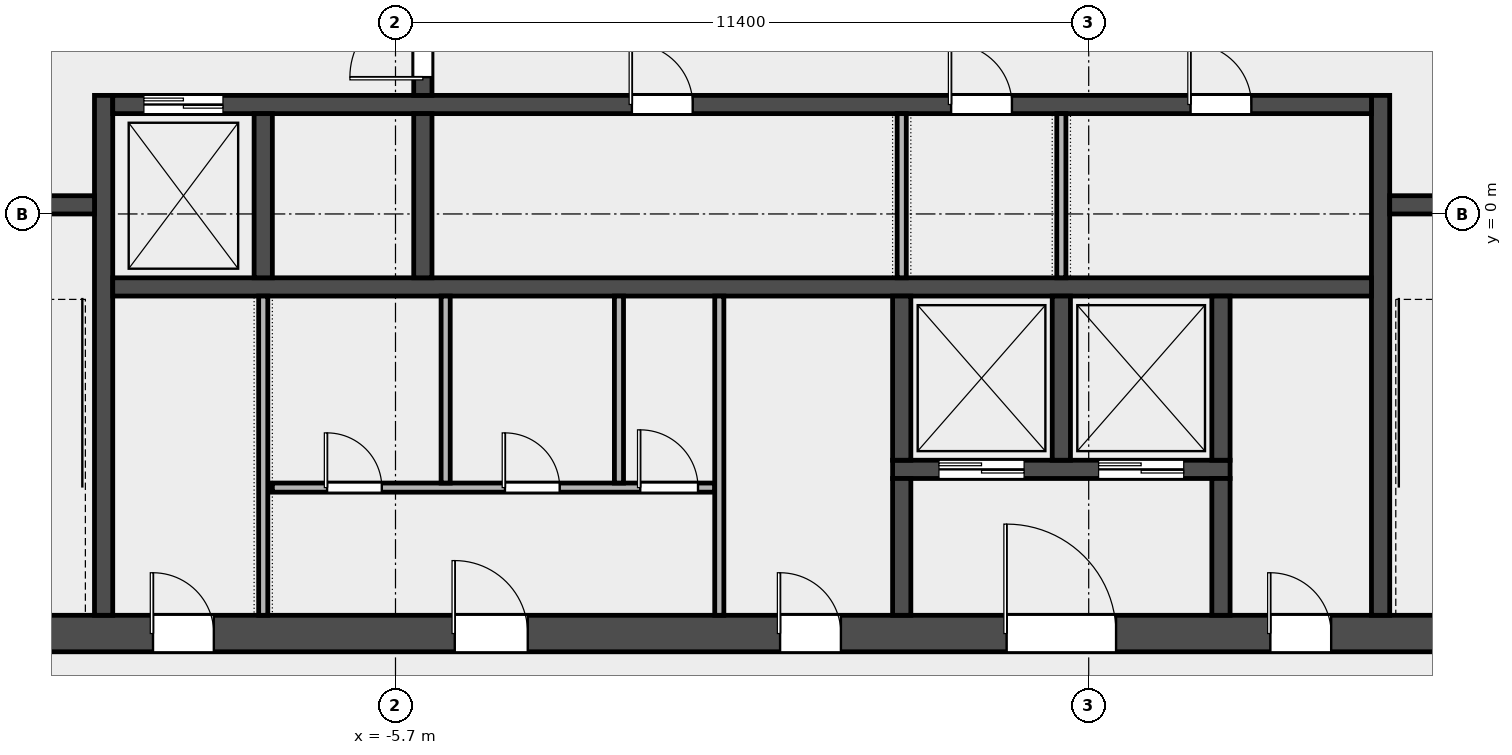
"""IFC4 building model, lengths in metres.
Left out: names, types, materials, properties, quantities, classifications, styles, units other than length and angle.
Written with IfcOpenShell. Run it as: python <this file> out.ifc"""

import sys

from ifc_helpers import new_model, si_unit, direction, frame, frame_2d, origin, place, context, subcontext, project, spatial, rectangle, extrude, element, fill, save


model = new_model("IFC4")
c1 = context("Model", 3, precision=1e-05, world=origin(), true_north=direction((0.0, 1.0)))
c2 = subcontext(c1, "Body", "Model", "MODEL_VIEW")
j1 = project(units=[si_unit("LENGTHUNIT", "METRE"), si_unit("PLANEANGLEUNIT", "RADIAN")], contexts=[c1])
p1 = place(None, origin())
s1 = spatial("IfcSite", under=j1, at=p1, CompositionType="ELEMENT")
p2 = place(p1, origin())
s2 = spatial("IfcBuilding", under=s1, at=p2, CompositionType="ELEMENT")
p3 = place(p2, frame((0.0, 0.0, 299.4)))
s3 = spatial("IfcBuildingStorey", under=s2, at=p3, CompositionType="ELEMENT", Elevation=299.4)
p4 = place(p3, frame((-14.4, -6.9, 0.0), z_axis=(0.0, 0.0, 1.0), x_axis=(1.0, 0.0, 0.0)))
e1 = element("IfcWall", 1, at=p4, inside=s3, PredefinedType="SHEAR", context=c2, shape_type="SweptSolid", body=[
    extrude(rectangle(XDim=28.8, YDim=0.6, at=frame_2d((14.4, 0.0))), origin(), (0.0, 0.0, 1.0), 3.7),
])
p5 = place(p4, frame((4.712, 0.0, 0.0)))
e2 = element("IfcOpeningElement", 2, at=p5, cuts=e1, PredefinedType="OPENING", context=c2, shape_type="SweptSolid", body=[
    extrude(rectangle(XDim=1.0, YDim=2.1, at=frame_2d((0.5, 1.05))), frame((0.0, 0.312, 0.0), z_axis=(0.0, -1.0, 0.0), x_axis=(1.0, 0.0, 0.0)), (0.0, 0.0, 1.0), 0.624),
])
p6 = place(p4, frame((9.675, 0.0, 0.0)))
e3 = element("IfcOpeningElement", 3, at=p6, cuts=e1, PredefinedType="OPENING", context=c2, shape_type="SweptSolid", body=[
    extrude(rectangle(XDim=1.2, YDim=2.1, at=frame_2d((0.6, 1.05))), frame((0.0, 0.312, 0.0), z_axis=(0.0, -1.0, 0.0), x_axis=(1.0, 0.0, 0.0)), (0.0, 0.0, 1.0), 0.624),
])
p7 = place(p4, frame((15.025, 0.0, 0.0)))
e4 = element("IfcOpeningElement", 4, at=p7, cuts=e1, PredefinedType="OPENING", context=c2, shape_type="SweptSolid", body=[
    extrude(rectangle(XDim=1.0, YDim=2.1, at=frame_2d((0.5, 1.05))), frame((0.0, 0.312, 0.0), z_axis=(0.0, -1.0, 0.0), x_axis=(1.0, 0.0, 0.0)), (0.0, 0.0, 1.0), 0.624),
])
p8 = place(p4, frame((18.75, 0.0, 0.0)))
e5 = element("IfcOpeningElement", 5, at=p8, cuts=e1, PredefinedType="OPENING", context=c2, shape_type="SweptSolid", body=[
    extrude(rectangle(XDim=1.8, YDim=2.1, at=frame_2d((0.9, 1.05))), frame((0.0, 0.312, 0.0), z_axis=(0.0, -1.0, 0.0), x_axis=(1.0, 0.0, 0.0)), (0.0, 0.0, 1.0), 0.624),
])
p9 = place(p4, frame((23.087, 0.0, 0.0)))
e6 = element("IfcOpeningElement", 6, at=p9, cuts=e1, PredefinedType="OPENING", context=c2, shape_type="SweptSolid", body=[
    extrude(rectangle(XDim=1.0, YDim=2.1, at=frame_2d((0.5, 1.05))), frame((0.0, 0.312, 0.0), z_axis=(0.0, -1.0, 0.0), x_axis=(1.0, 0.0, 0.0)), (0.0, 0.0, 1.0), 0.624),
])
for number, where, z_axis, x_axis in (
    (7, (-10.5, -6.6, 0.0), (0.0, 0.0, 1.0), (0.0, 1.0, 0.0)),
    (8, (10.5, -6.6, 0.0), (0.0, 0.0, 1.0), (0.0, 1.0, 0.0)),
):
    element("IfcWall", number, at=place(p3, frame(where, z_axis=z_axis, x_axis=x_axis)), inside=s3, PredefinedType="SHEAR", context=c2, shape_type="SweptSolid", body=[
        extrude(rectangle(XDim=8.55, YDim=0.3, at=frame_2d((4.275, 0.0))), origin(), (0.0, 0.0, 1.0), 3.7),
    ])
p10 = place(p3, frame((-13.8, 0.15, 0.0), z_axis=(0.0, 0.0, 1.0), x_axis=(1.0, 0.0, 0.0)))
e9 = element("IfcWall", 9, at=p10, inside=s3, PredefinedType="SOLIDWALL", context=c2, shape_type="SweptSolid", body=[
    extrude(rectangle(XDim=3.15, YDim=0.3, at=frame_2d((1.575, 0.0))), origin(), (0.0, 0.0, 1.0), 3.7),
])
p11 = place(p10, frame((0.975, 0.0, 0.0)))
e10 = element("IfcOpeningElement", 10, at=p11, cuts=e9, PredefinedType="OPENING", context=c2, shape_type="SweptSolid", body=[
    extrude(rectangle(XDim=1.1, YDim=2.1, at=frame_2d((0.55, 1.05))), frame((0.0, 0.162, 0.0), z_axis=(0.0, -1.0, 0.0), x_axis=(1.0, 0.0, 0.0)), (0.0, 0.0, 1.0), 0.324),
])
p12 = place(p3, frame((10.65, 0.15, 0.0), z_axis=(0.0, 0.0, 1.0), x_axis=(1.0, 0.0, 0.0)))
e11 = element("IfcWall", 11, at=p12, inside=s3, PredefinedType="SOLIDWALL", context=c2, shape_type="SweptSolid", body=[
    extrude(rectangle(XDim=3.15, YDim=0.3, at=frame_2d((1.575, 0.0))), origin(), (0.0, 0.0, 1.0), 3.7),
])
p13 = place(p12, frame((1.025, 0.0, 0.0)))
e12 = element("IfcOpeningElement", 12, at=p13, cuts=e11, PredefinedType="OPENING", context=c2, shape_type="SweptSolid", body=[
    extrude(rectangle(XDim=1.1, YDim=2.1, at=frame_2d((0.55, 1.05))), frame((0.0, 0.162, 0.0), z_axis=(0.0, -1.0, 0.0), x_axis=(1.0, 0.0, 0.0)), (0.0, 0.0, 1.0), 0.324),
])
p14 = place(p3, frame((-10.35, -1.2, 0.0), z_axis=(0.0, 0.0, 1.0), x_axis=(1.0, 0.0, 0.0)))
e13 = element("IfcWall", 13, at=p14, inside=s3, PredefinedType="SOLIDWALL", context=c2, shape_type="SweptSolid", body=[
    extrude(rectangle(XDim=20.7, YDim=0.3, at=frame_2d((10.35, 0.0))), origin(), (0.0, 0.0, 1.0), 3.7),
])
p15 = place(p3, frame((-10.35, 1.8, 0.0), z_axis=(0.0, 0.0, 1.0), x_axis=(1.0, 0.0, 0.0)))
e14 = element("IfcWall", 14, at=p15, inside=s3, PredefinedType="SOLIDWALL", context=c2, shape_type="SweptSolid", body=[
    extrude(rectangle(XDim=20.7, YDim=0.3, at=frame_2d((10.35, 0.0))), origin(), (0.0, 0.0, 1.0), 3.7),
])
p16 = place(p15, frame((0.512, 0.0, 0.0)))
e15 = element("IfcOpeningElement", 15, at=p16, cuts=e14, PredefinedType="OPENING", context=c2, shape_type="SweptSolid", body=[
    extrude(rectangle(XDim=1.3, YDim=2.1, at=frame_2d((0.65, 1.05))), frame((0.0, 0.162, 0.0), z_axis=(0.0, -1.0, 0.0), x_axis=(1.0, 0.0, 0.0)), (0.0, 0.0, 1.0), 0.324),
])
p17 = place(p15, frame((8.538, 0.0, 0.0)))
e16 = element("IfcOpeningElement", 16, at=p17, cuts=e14, PredefinedType="OPENING", context=c2, shape_type="SweptSolid", body=[
    extrude(rectangle(XDim=1.0, YDim=2.1, at=frame_2d((0.5, 1.05))), frame((0.0, 0.162, 0.0), z_axis=(0.0, -1.0, 0.0), x_axis=(1.0, 0.0, 0.0)), (0.0, 0.0, 1.0), 0.324),
])
p18 = place(p15, frame((13.788, 0.0, 0.0)))
e17 = element("IfcOpeningElement", 17, at=p18, cuts=e14, PredefinedType="OPENING", context=c2, shape_type="SweptSolid", body=[
    extrude(rectangle(XDim=1.0, YDim=2.1, at=frame_2d((0.5, 1.05))), frame((0.0, 0.162, 0.0), z_axis=(0.0, -1.0, 0.0), x_axis=(1.0, 0.0, 0.0)), (0.0, 0.0, 1.0), 0.324),
])
p19 = place(p15, frame((17.725, 0.0, 0.0)))
e18 = element("IfcOpeningElement", 18, at=p19, cuts=e14, PredefinedType="OPENING", context=c2, shape_type="SweptSolid", body=[
    extrude(rectangle(XDim=1.0, YDim=2.1, at=frame_2d((0.5, 1.05))), frame((0.0, 0.162, 0.0), z_axis=(0.0, -1.0, 0.0), x_axis=(1.0, 0.0, 0.0)), (0.0, 0.0, 1.0), 0.324),
])
for number, where, z_axis, x_axis in (
    (19, (-7.875, -1.05, 0.0), (0.0, 0.0, 1.0), (0.0, 1.0, 0.0)),
    (20, (-5.25, -1.05, 0.0), (0.0, 0.0, 1.0), (0.0, 1.0, 0.0)),
):
    element("IfcWall", number, at=place(p3, frame(where, z_axis=z_axis, x_axis=x_axis)), inside=s3, PredefinedType="SOLIDWALL", context=c2, shape_type="SweptSolid", body=[
        extrude(rectangle(XDim=2.7, YDim=0.3, at=frame_2d((1.35, 0.0))), origin(), (0.0, 0.0, 1.0), 3.7),
    ])
p20 = place(p3, frame((-5.25, 1.95, 0.0), z_axis=(0.0, 0.0, 1.0), x_axis=(0.0, 1.0, 0.0)))
e21 = element("IfcWall", 21, at=p20, inside=s3, PredefinedType="SOLIDWALL", context=c2, shape_type="SweptSolid", body=[
    extrude(rectangle(XDim=3.3, YDim=0.3, at=frame_2d((1.65, 0.0))), origin(), (0.0, 0.0, 1.0), 3.7),
])
p21 = place(p20, frame((0.3, 0.0, 0.0)))
e22 = element("IfcOpeningElement", 22, at=p21, cuts=e21, PredefinedType="OPENING", context=c2, shape_type="SweptSolid", body=[
    extrude(rectangle(XDim=1.2, YDim=2.1, at=frame_2d((0.6, 1.05))), frame((0.0, 0.162, 0.0), z_axis=(0.0, -1.0, 0.0), x_axis=(1.0, 0.0, 0.0)), (0.0, 0.0, 1.0), 0.324),
])
p22 = place(p20, frame((1.8, 0.0, 0.0)))
e23 = element("IfcOpeningElement", 23, at=p22, cuts=e21, PredefinedType="OPENING", context=c2, shape_type="SweptSolid", body=[
    extrude(rectangle(XDim=1.2, YDim=2.1, at=frame_2d((0.6, 1.05))), frame((0.0, 0.162, 0.0), z_axis=(0.0, -1.0, 0.0), x_axis=(1.0, 0.0, 0.0)), (0.0, 0.0, 1.0), 0.324),
])
p23 = place(p3, frame((2.475, -4.2, 0.0), z_axis=(0.0, 0.0, 1.0), x_axis=(1.0, 0.0, 0.0)))
e24 = element("IfcWall", 24, at=p23, inside=s3, PredefinedType="SOLIDWALL", context=c2, shape_type="SweptSolid", body=[
    extrude(rectangle(XDim=5.55, YDim=0.3, at=frame_2d((2.775, 0.0))), origin(), (0.0, 0.0, 1.0), 3.7),
])
p24 = place(p23, frame((0.762, 0.0, 0.0)))
e25 = element("IfcOpeningElement", 25, at=p24, cuts=e24, PredefinedType="OPENING", context=c2, shape_type="SweptSolid", body=[
    extrude(rectangle(XDim=1.4, YDim=2.1, at=frame_2d((0.7, 1.05))), frame((0.0, 0.162, 0.0), z_axis=(0.0, -1.0, 0.0), x_axis=(1.0, 0.0, 0.0)), (0.0, 0.0, 1.0), 0.324),
])
p25 = place(p23, frame((3.387, 0.0, 0.0)))
e26 = element("IfcOpeningElement", 26, at=p25, cuts=e24, PredefinedType="OPENING", context=c2, shape_type="SweptSolid", body=[
    extrude(rectangle(XDim=1.4, YDim=2.1, at=frame_2d((0.7, 1.05))), frame((0.0, 0.162, 0.0), z_axis=(0.0, -1.0, 0.0), x_axis=(1.0, 0.0, 0.0)), (0.0, 0.0, 1.0), 0.324),
])
p26 = place(p3, frame((2.625, -4.05, 0.0), z_axis=(0.0, 0.0, 1.0), x_axis=(0.0, 1.0, 0.0)))
e27 = element("IfcWall", 27, at=p26, inside=s3, PredefinedType="SOLIDWALL", context=c2, shape_type="SweptSolid", body=[
    extrude(rectangle(XDim=2.7, YDim=0.3, at=frame_2d((1.35, 0.0))), origin(), (0.0, 0.0, 1.0), 3.7),
])
p27 = place(p3, frame((2.625, -6.6, 0.0), z_axis=(0.0, 0.0, 1.0), x_axis=(0.0, 1.0, 0.0)))
e28 = element("IfcWall", 28, at=p27, inside=s3, PredefinedType="SOLIDWALL", context=c2, shape_type="SweptSolid", body=[
    extrude(rectangle(XDim=2.25, YDim=0.3, at=frame_2d((1.125, 0.0))), origin(), (0.0, 0.0, 1.0), 3.7),
])
for number, where, z_axis, x_axis in (
    (29, (5.25, -4.05, 0.0), (0.0, 0.0, 1.0), (0.0, 1.0, 0.0)),
    (30, (7.875, -4.05, 0.0), (0.0, 0.0, 1.0), (0.0, 1.0, 0.0)),
):
    element("IfcWall", number, at=place(p3, frame(where, z_axis=z_axis, x_axis=x_axis)), inside=s3, PredefinedType="SOLIDWALL", context=c2, shape_type="SweptSolid", body=[
        extrude(rectangle(XDim=2.7, YDim=0.3, at=frame_2d((1.35, 0.0))), origin(), (0.0, 0.0, 1.0), 3.7),
    ])
p28 = place(p3, frame((7.875, -6.6, 0.0), z_axis=(0.0, 0.0, 1.0), x_axis=(0.0, 1.0, 0.0)))
e31 = element("IfcWall", 31, at=p28, inside=s3, PredefinedType="SOLIDWALL", context=c2, shape_type="SweptSolid", body=[
    extrude(rectangle(XDim=2.25, YDim=0.3, at=frame_2d((1.125, 0.0))), origin(), (0.0, 0.0, 1.0), 3.7),
])
p29 = place(p3, frame((-7.875, -6.6, 0.0), z_axis=(0.0, 0.0, 1.0), x_axis=(0.0, 1.0, 0.0)))
e32 = element("IfcWall", 32, at=p29, inside=s3, PredefinedType="PARTITIONING", context=c2, shape_type="SweptSolid", body=[
    extrude(rectangle(XDim=5.25, YDim=0.15, at=frame_2d((2.625, 0.0))), origin(), (0.0, 0.0, 1.0), 3.7),
])
p30 = place(p3, frame((-7.725, -4.5, 0.0), z_axis=(0.0, 0.0, 1.0), x_axis=(1.0, 0.0, 0.0)))
e33 = element("IfcWall", 33, at=p30, inside=s3, PredefinedType="PARTITIONING", context=c2, shape_type="SweptSolid", body=[
    extrude(rectangle(XDim=7.275, YDim=0.15, at=frame_2d((3.638, 0.0))), origin(), (0.0, 0.0, 1.0), 3.7),
])
p31 = place(p30, frame((0.9, 0.0, 0.0)))
e34 = element("IfcOpeningElement", 34, at=p31, cuts=e33, PredefinedType="OPENING", context=c2, shape_type="SweptSolid", body=[
    extrude(rectangle(XDim=0.9, YDim=2.1, at=frame_2d((0.45, 1.05))), frame((0.0, 0.087, 0.0), z_axis=(0.0, -1.0, 0.0), x_axis=(1.0, 0.0, 0.0)), (0.0, 0.0, 1.0), 0.174),
])
p32 = place(p30, frame((3.825, 0.0, 0.0)))
e35 = element("IfcOpeningElement", 35, at=p32, cuts=e33, PredefinedType="OPENING", context=c2, shape_type="SweptSolid", body=[
    extrude(rectangle(XDim=0.9, YDim=2.1, at=frame_2d((0.45, 1.05))), frame((0.0, 0.087, 0.0), z_axis=(0.0, -1.0, 0.0), x_axis=(1.0, 0.0, 0.0)), (0.0, 0.0, 1.0), 0.174),
])
p33 = place(p30, frame((6.05, 0.0, 0.0)))
e36 = element("IfcOpeningElement", 36, at=p33, cuts=e33, PredefinedType="OPENING", context=c2, shape_type="SweptSolid", body=[
    extrude(rectangle(XDim=0.95, YDim=2.1, at=frame_2d((0.475, 1.05))), frame((0.0, 0.087, 0.0), z_axis=(0.0, -1.0, 0.0), x_axis=(1.0, 0.0, 0.0)), (0.0, 0.0, 1.0), 0.174),
])
for number, where, z_axis, x_axis in (
    (37, (-4.875, -4.425, 0.0), (0.0, 0.0, 1.0), (0.0, 1.0, 0.0)),
    (38, (-2.025, -4.425, 0.0), (0.0, 0.0, 1.0), (0.0, 1.0, 0.0)),
):
    element("IfcWall", number, at=place(p3, frame(where, z_axis=z_axis, x_axis=x_axis)), inside=s3, PredefinedType="PARTITIONING", context=c2, shape_type="SweptSolid", body=[
        extrude(rectangle(XDim=3.075, YDim=0.15, at=frame_2d((1.538, 0.0))), origin(), (0.0, 0.0, 1.0), 3.7),
    ])
p34 = place(p3, frame((-0.375, -6.6, 0.0), z_axis=(0.0, 0.0, 1.0), x_axis=(0.0, 1.0, 0.0)))
e39 = element("IfcWall", 39, at=p34, inside=s3, PredefinedType="PARTITIONING", context=c2, shape_type="SweptSolid", body=[
    extrude(rectangle(XDim=5.25, YDim=0.15, at=frame_2d((2.625, 0.0))), origin(), (0.0, 0.0, 1.0), 3.7),
])
for number, where, z_axis, x_axis in (
    (40, (2.625, -1.05, 0.0), (0.0, 0.0, 1.0), (0.0, 1.0, 0.0)),
    (41, (5.25, -1.05, 0.0), (0.0, 0.0, 1.0), (0.0, 1.0, 0.0)),
):
    element("IfcWall", number, at=place(p3, frame(where, z_axis=z_axis, x_axis=x_axis)), inside=s3, PredefinedType="PARTITIONING", context=c2, shape_type="SweptSolid", body=[
        extrude(rectangle(XDim=2.7, YDim=0.15, at=frame_2d((1.35, 0.0))), origin(), (0.0, 0.0, 1.0), 3.7),
    ])
p35 = place(p21, origin())
e42 = element("IfcDoor", 42, at=p35, inside=s3, OperationType="SINGLE_SWING_LEFT", PredefinedType="DOOR", context=c2, shape_type="SweptSolid", body=[
    extrude(rectangle(XDim=1.2, YDim=2.1, at=frame_2d((0.6, 1.05))), frame((0.0, 0.025, 0.0), z_axis=(0.0, -1.0, 0.0), x_axis=(1.0, 0.0, 0.0)), (0.0, 0.0, 1.0), 0.05),
])
fill(e22, e42)
p36 = place(p16, origin())
e43 = element("IfcDoor", 43, at=p36, inside=s3, OperationType="DOUBLE_DOOR_SLIDING", PredefinedType="DOOR", context=c2, shape_type="SweptSolid", body=[
    extrude(rectangle(XDim=1.3, YDim=2.1, at=frame_2d((0.65, 1.05))), frame((0.0, 0.025, 0.0), z_axis=(0.0, -1.0, 0.0), x_axis=(1.0, 0.0, 0.0)), (0.0, 0.0, 1.0), 0.05),
])
fill(e15, e43)
p37 = place(p24, origin())
e44 = element("IfcDoor", 44, at=p37, inside=s3, OperationType="DOUBLE_DOOR_SLIDING", PredefinedType="DOOR", context=c2, shape_type="SweptSolid", body=[
    extrude(rectangle(XDim=1.4, YDim=2.1, at=frame_2d((0.7, 1.05))), frame((0.0, 0.025, 0.0), z_axis=(0.0, -1.0, 0.0), x_axis=(1.0, 0.0, 0.0)), (0.0, 0.0, 1.0), 0.05),
])
fill(e25, e44)
p38 = place(p25, origin())
e45 = element("IfcDoor", 45, at=p38, inside=s3, OperationType="DOUBLE_DOOR_SLIDING", PredefinedType="DOOR", context=c2, shape_type="SweptSolid", body=[
    extrude(rectangle(XDim=1.4, YDim=2.1, at=frame_2d((0.7, 1.05))), frame((0.0, 0.025, 0.0), z_axis=(0.0, -1.0, 0.0), x_axis=(1.0, 0.0, 0.0)), (0.0, 0.0, 1.0), 0.05),
])
fill(e26, e45)
p39 = place(p5, origin())
e46 = element("IfcDoor", 46, at=p39, inside=s3, OperationType="SINGLE_SWING_LEFT", PredefinedType="DOOR", context=c2, shape_type="SweptSolid", body=[
    extrude(rectangle(XDim=1.0, YDim=2.1, at=frame_2d((0.5, 1.05))), frame((0.0, 0.025, 0.0), z_axis=(0.0, -1.0, 0.0), x_axis=(1.0, 0.0, 0.0)), (0.0, 0.0, 1.0), 0.05),
])
fill(e2, e46)
p40 = place(p6, origin())
e47 = element("IfcDoor", 47, at=p40, inside=s3, OperationType="SINGLE_SWING_LEFT", PredefinedType="DOOR", context=c2, shape_type="SweptSolid", body=[
    extrude(rectangle(XDim=1.2, YDim=2.1, at=frame_2d((0.6, 1.05))), frame((0.0, 0.025, 0.0), z_axis=(0.0, -1.0, 0.0), x_axis=(1.0, 0.0, 0.0)), (0.0, 0.0, 1.0), 0.05),
])
fill(e3, e47)
p41 = place(p31, origin())
e48 = element("IfcDoor", 48, at=p41, inside=s3, OperationType="SINGLE_SWING_LEFT", PredefinedType="DOOR", context=c2, shape_type="SweptSolid", body=[
    extrude(rectangle(XDim=0.9, YDim=2.1, at=frame_2d((0.45, 1.05))), frame((0.0, 0.025, 0.0), z_axis=(0.0, -1.0, 0.0), x_axis=(1.0, 0.0, 0.0)), (0.0, 0.0, 1.0), 0.05),
])
fill(e34, e48)
p42 = place(p32, origin())
e49 = element("IfcDoor", 49, at=p42, inside=s3, OperationType="SINGLE_SWING_LEFT", PredefinedType="DOOR", context=c2, shape_type="SweptSolid", body=[
    extrude(rectangle(XDim=0.9, YDim=2.1, at=frame_2d((0.45, 1.05))), frame((0.0, 0.025, 0.0), z_axis=(0.0, -1.0, 0.0), x_axis=(1.0, 0.0, 0.0)), (0.0, 0.0, 1.0), 0.05),
])
fill(e35, e49)
p43 = place(p33, origin())
e50 = element("IfcDoor", 50, at=p43, inside=s3, OperationType="SINGLE_SWING_LEFT", PredefinedType="DOOR", context=c2, shape_type="SweptSolid", body=[
    extrude(rectangle(XDim=0.95, YDim=2.1, at=frame_2d((0.475, 1.05))), frame((0.0, 0.025, 0.0), z_axis=(0.0, -1.0, 0.0), x_axis=(1.0, 0.0, 0.0)), (0.0, 0.0, 1.0), 0.05),
])
fill(e36, e50)
p44 = place(p7, origin())
e51 = element("IfcDoor", 51, at=p44, inside=s3, OperationType="SINGLE_SWING_LEFT", PredefinedType="DOOR", context=c2, shape_type="SweptSolid", body=[
    extrude(rectangle(XDim=1.0, YDim=2.1, at=frame_2d((0.5, 1.05))), frame((0.0, 0.025, 0.0), z_axis=(0.0, -1.0, 0.0), x_axis=(1.0, 0.0, 0.0)), (0.0, 0.0, 1.0), 0.05),
])
fill(e4, e51)
p45 = place(p8, origin())
e52 = element("IfcDoor", 52, at=p45, inside=s3, OperationType="DOUBLE_DOOR_SINGLE_SWING", PredefinedType="DOOR", context=c2, shape_type="SweptSolid", body=[
    extrude(rectangle(XDim=1.8, YDim=2.1, at=frame_2d((0.9, 1.05))), frame((0.0, 0.025, 0.0), z_axis=(0.0, -1.0, 0.0), x_axis=(1.0, 0.0, 0.0)), (0.0, 0.0, 1.0), 0.05),
])
fill(e5, e52)
p46 = place(p9, origin())
e53 = element("IfcDoor", 53, at=p46, inside=s3, OperationType="SINGLE_SWING_LEFT", PredefinedType="DOOR", context=c2, shape_type="SweptSolid", body=[
    extrude(rectangle(XDim=1.0, YDim=2.1, at=frame_2d((0.5, 1.05))), frame((0.0, 0.025, 0.0), z_axis=(0.0, -1.0, 0.0), x_axis=(1.0, 0.0, 0.0)), (0.0, 0.0, 1.0), 0.05),
])
fill(e6, e53)
p47 = place(p17, origin())
e54 = element("IfcDoor", 54, at=p47, inside=s3, OperationType="SINGLE_SWING_LEFT", PredefinedType="DOOR", context=c2, shape_type="SweptSolid", body=[
    extrude(rectangle(XDim=1.0, YDim=2.1, at=frame_2d((0.5, 1.05))), frame((0.0, 0.025, 0.0), z_axis=(0.0, -1.0, 0.0), x_axis=(1.0, 0.0, 0.0)), (0.0, 0.0, 1.0), 0.05),
])
fill(e16, e54)
p48 = place(p18, origin())
e55 = element("IfcDoor", 55, at=p48, inside=s3, OperationType="SINGLE_SWING_LEFT", PredefinedType="DOOR", context=c2, shape_type="SweptSolid", body=[
    extrude(rectangle(XDim=1.0, YDim=2.1, at=frame_2d((0.5, 1.05))), frame((0.0, 0.025, 0.0), z_axis=(0.0, -1.0, 0.0), x_axis=(1.0, 0.0, 0.0)), (0.0, 0.0, 1.0), 0.05),
])
fill(e17, e55)
p49 = place(p19, origin())
e56 = element("IfcDoor", 56, at=p49, inside=s3, OperationType="SINGLE_SWING_LEFT", PredefinedType="DOOR", context=c2, shape_type="SweptSolid", body=[
    extrude(rectangle(XDim=1.0, YDim=2.1, at=frame_2d((0.5, 1.05))), frame((0.0, 0.025, 0.0), z_axis=(0.0, -1.0, 0.0), x_axis=(1.0, 0.0, 0.0)), (0.0, 0.0, 1.0), 0.05),
])
fill(e18, e56)
save(model, sys.argv[1])
